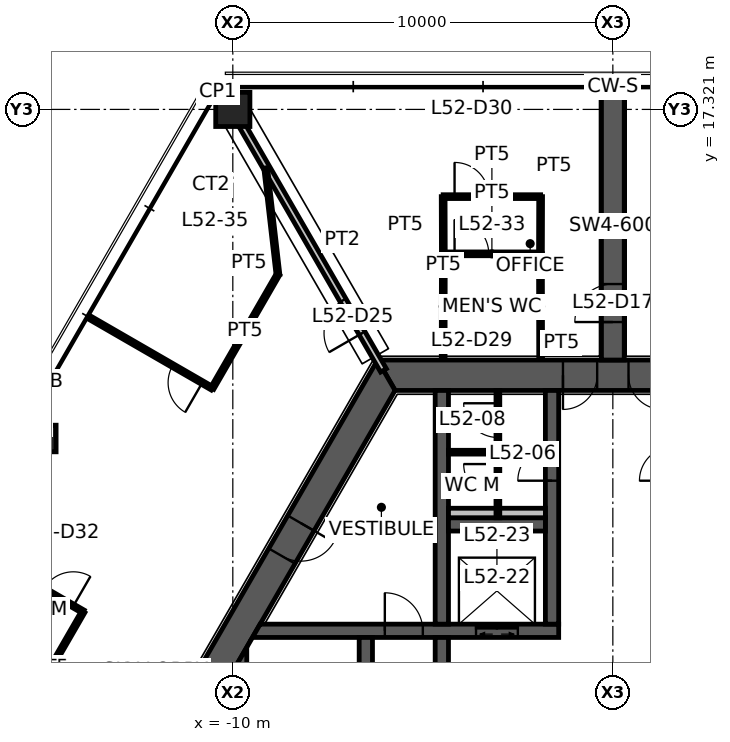
"""IFC4 building model, lengths in metres.
Left out: names, types, materials, properties, quantities, classifications, styles, units other than length and angle.
Written with IfcOpenShell. Run it as: python <this file> out.ifc"""

import sys

from ifc_helpers import new_model, si_unit, direction, frame, frame_2d, origin, origin_2d, place, context, subcontext, project, spatial, polyline, rectangle, hollow_rectangle, outline, extrude, element, fill, save


model = new_model("IFC4")
c1 = context("Model", 3, precision=1e-05, world=origin(), true_north=direction((0.0, 1.0)))
c2 = subcontext(c1, "Body", "Model", "MODEL_VIEW")
j1 = project(units=[si_unit("LENGTHUNIT", "METRE"), si_unit("PLANEANGLEUNIT", "RADIAN")], contexts=[c1])
p1 = place(None, origin())
s1 = spatial("IfcSite", under=j1, at=p1, CompositionType="ELEMENT")
p2 = place(p1, origin())
s2 = spatial("IfcBuilding", under=s1, at=p2, CompositionType="ELEMENT")
p3 = place(p2, frame((0.0, 0.0, 208.3)))
s3 = spatial("IfcBuildingStorey", under=s2, at=p3, CompositionType="ELEMENT", Elevation=208.3)
p4 = place(p3, frame((-10.0, 17.321, 0.0), z_axis=(0.0, 0.0, 1.0), x_axis=(1.0, 0.0, 0.0)))
e1 = element("IfcColumn", 1, at=p4, inside=s3, PredefinedType="COLUMN", context=c2, shape_type="SweptSolid", body=[
    extrude(hollow_rectangle(XDim=0.9, YDim=0.9, WallThickness=0.09, at=origin_2d()), origin(), (0.0, 0.0, 1.0), 4.5),
])
p5 = place(p3, frame((-15.0, 8.66, 0.0), z_axis=(0.0, 0.0, 1.0), x_axis=(1.0, 0.0, 0.0)))
e2 = element("IfcColumn", 2, at=p5, inside=s3, PredefinedType="COLUMN", context=c2, shape_type="SweptSolid", body=[
    extrude(hollow_rectangle(XDim=0.7, YDim=0.7, WallThickness=0.036, at=origin_2d()), origin(), (0.0, 0.0, 1.0), 4.5),
])
p6 = place(p3, frame((5.961, 10.325, 0.0), z_axis=(0.0, 0.0, 1.0), x_axis=(-1.0, 0.0, 0.0)))
e3 = element("IfcWall", 3, at=p6, inside=s3, PredefinedType="SHEAR", context=c2, shape_type="SweptSolid", body=[
    extrude(outline(polyline([(-0.231, -0.4), (4.649, -0.4), (5.549, -0.4), (6.374, -0.4), (7.273, -0.4), (12.153, -0.4), (11.691, 0.4), (7.273, 0.4), (6.374, 0.4), (5.549, 0.4), (4.649, 0.4), (0.231, 0.4), (-0.231, -0.4)])), origin(), (0.0, 0.0, 1.0), 4.5),
])
p7 = place(p6, frame((6.374, 0.0, 0.0)))
e4 = element("IfcOpeningElement", 4, at=p7, cuts=e3, PredefinedType="OPENING", context=c2, shape_type="SweptSolid", body=[
    extrude(rectangle(XDim=0.9, YDim=2.1, at=frame_2d((0.45, 1.05))), frame((0.0, 0.41, 0.0), z_axis=(0.0, -1.0, 0.0), x_axis=(1.0, 0.0, 0.0)), (0.0, 0.0, 1.0), 0.82),
])
p8 = place(p6, frame((4.649, 0.0, 0.0)))
e5 = element("IfcOpeningElement", 5, at=p8, cuts=e3, PredefinedType="OPENING", context=c2, shape_type="SweptSolid", body=[
    extrude(rectangle(XDim=0.9, YDim=2.1, at=frame_2d((0.45, 1.05))), frame((0.0, 0.41, 0.0), z_axis=(0.0, -1.0, 0.0), x_axis=(1.0, 0.0, 0.0)), (0.0, 0.0, 1.0), 0.82),
])
p9 = place(p3, frame((-5.961, 10.325, 0.0), z_axis=(0.0, 0.0, 1.0), x_axis=(-0.500004296715, -0.866022923061, 0.0)))
e6 = element("IfcWall", 6, at=p9, inside=s3, PredefinedType="SHEAR", context=c2, shape_type="SweptSolid", body=[
    extrude(outline(polyline([(-0.231, -0.4), (4.494, -0.4), (5.494, -0.4), (12.153, -0.4), (11.691, 0.4), (5.494, 0.4), (4.494, 0.4), (0.231, 0.4), (-0.231, -0.4)])), origin(), (0.0, 0.0, 1.0), 4.5),
])
p10 = place(p9, frame((4.494, 0.0, 0.0)))
e7 = element("IfcOpeningElement", 7, at=p10, cuts=e6, PredefinedType="OPENING", context=c2, shape_type="SweptSolid", body=[
    extrude(rectangle(XDim=1.0, YDim=2.1, at=frame_2d((0.5, 1.05))), frame((0.0, 0.41, 0.0), z_axis=(0.0, -1.0, 0.0), x_axis=(1.0, 0.0, 0.0)), (0.0, 0.0, 1.0), 0.82),
])
p11 = place(p3, frame((0.0, 10.725, 0.0), z_axis=(0.0, 0.0, 1.0), x_axis=(0.0, 1.0, 0.0)))
e8 = element("IfcWall", 8, at=p11, inside=s3, PredefinedType="SHEAR", context=c2, shape_type="SweptSolid", body=[
    extrude(rectangle(XDim=7.045, YDim=0.6, at=frame_2d((3.523, 0.0))), origin(), (0.0, 0.0, 1.0), 4.5),
])
p12 = place(p11, frame((1.0, 0.0, 0.0)))
e9 = element("IfcOpeningElement", 9, at=p12, cuts=e8, PredefinedType="OPENING", context=c2, shape_type="SweptSolid", body=[
    extrude(rectangle(XDim=1.0, YDim=2.1, at=frame_2d((0.5, 1.05))), frame((0.0, 0.31, 0.0), z_axis=(0.0, -1.0, 0.0), x_axis=(1.0, 0.0, 0.0)), (0.0, 0.0, 1.0), 0.62),
])
p13 = place(p3, frame((-9.382, 3.6, 0.0), z_axis=(0.0, 0.0, 1.0), x_axis=(1.0, 0.0, 0.0)))
e10 = element("IfcWall", 10, at=p13, inside=s3, PredefinedType="SHEAR", context=c2, shape_type="SweptSolid", body=[
    extrude(outline(polyline([(-0.101, -0.175), (3.382, -0.175), (4.382, -0.175), (5.782, -0.175), (6.882, -0.175), (7.957, -0.175), (7.957, 0.175), (6.882, 0.175), (5.782, 0.175), (4.382, 0.175), (3.382, 0.175), (0.101, 0.175), (-0.101, -0.175)])), origin(), (0.0, 0.0, 1.0), 4.5),
])
p14 = place(p13, frame((3.382, 0.0, 0.0)))
e11 = element("IfcOpeningElement", 11, at=p14, cuts=e10, PredefinedType="OPENING", context=c2, shape_type="SweptSolid", body=[
    extrude(rectangle(XDim=1.0, YDim=2.1, at=frame_2d((0.5, 1.05))), frame((0.0, 0.185, 0.0), z_axis=(0.0, -1.0, 0.0), x_axis=(1.0, 0.0, 0.0)), (0.0, 0.0, 1.0), 0.37),
])
p15 = place(p13, frame((5.782, 0.0, 0.0)))
e12 = element("IfcOpeningElement", 12, at=p15, cuts=e10, PredefinedType="OPENING", context=c2, shape_type="SweptSolid", body=[
    extrude(rectangle(XDim=1.1, YDim=2.1, at=frame_2d((0.55, 1.05))), frame((0.0, 0.185, 0.0), z_axis=(0.0, -1.0, 0.0), x_axis=(1.0, 0.0, 0.0)), (0.0, 0.0, 1.0), 0.37),
])
p16 = place(p3, frame((-1.6, 3.775, 0.0), z_axis=(0.0, 0.0, 1.0), x_axis=(0.0, 1.0, 0.0)))
e13 = element("IfcWall", 13, at=p16, inside=s3, PredefinedType="SHEAR", context=c2, shape_type="SweptSolid", body=[
    extrude(rectangle(XDim=6.15, YDim=0.35, at=frame_2d((3.075, 0.0))), origin(), (0.0, 0.0, 1.0), 4.5),
])
p17 = place(p16, frame((3.775, 0.0, 0.0)))
e14 = element("IfcOpeningElement", 14, at=p17, cuts=e13, PredefinedType="OPENING", context=c2, shape_type="SweptSolid", body=[
    extrude(rectangle(XDim=0.9, YDim=2.1, at=frame_2d((0.45, 1.05))), frame((0.0, 0.185, 0.0), z_axis=(0.0, -1.0, 0.0), x_axis=(1.0, 0.0, 0.0)), (0.0, 0.0, 1.0), 0.37),
])
p18 = place(p3, frame((-4.5, -3.425, 0.0), z_axis=(0.0, 0.0, 1.0), x_axis=(0.0, 1.0, 0.0)))
e15 = element("IfcWall", 15, at=p18, inside=s3, PredefinedType="SHEAR", context=c2, shape_type="SweptSolid", body=[
    extrude(rectangle(XDim=6.85, YDim=0.35, at=frame_2d((3.425, 0.0))), origin(), (0.0, 0.0, 1.0), 4.5),
])
p19 = place(p18, frame((2.925, 0.0, 0.0)))
e16 = element("IfcOpeningElement", 16, at=p19, cuts=e15, PredefinedType="OPENING", context=c2, shape_type="SweptSolid", body=[
    extrude(rectangle(XDim=1.0, YDim=2.1, at=frame_2d((0.5, 1.05))), frame((0.0, 0.185, 0.0), z_axis=(0.0, -1.0, 0.0), x_axis=(1.0, 0.0, 0.0)), (0.0, 0.0, 1.0), 0.37),
])
p20 = place(p3, frame((-6.5, -3.425, 0.0), z_axis=(0.0, 0.0, 1.0), x_axis=(0.0, 1.0, 0.0)))
e17 = element("IfcWall", 17, at=p20, inside=s3, PredefinedType="SHEAR", context=c2, shape_type="SweptSolid", body=[
    extrude(rectangle(XDim=6.85, YDim=0.35, at=frame_2d((3.425, 0.0))), origin(), (0.0, 0.0, 1.0), 4.5),
])
p21 = place(p20, frame((0.1, 0.0, 0.0)))
e18 = element("IfcOpeningElement", 18, at=p21, cuts=e17, PredefinedType="OPENING", context=c2, shape_type="SweptSolid", body=[
    extrude(rectangle(XDim=1.0, YDim=2.1, at=frame_2d((0.5, 1.05))), frame((0.0, 0.185, 0.0), z_axis=(0.0, -1.0, 0.0), x_axis=(1.0, 0.0, 0.0)), (0.0, 0.0, 1.0), 0.37),
])
p22 = place(p3, frame((-4.5, 3.775, 0.0), z_axis=(0.0, 0.0, 1.0), x_axis=(0.0, 1.0, 0.0)))
e19 = element("IfcWall", 19, at=p22, inside=s3, PredefinedType="SHEAR", context=c2, shape_type="SweptSolid", body=[
    extrude(rectangle(XDim=6.15, YDim=0.35, at=frame_2d((3.075, 0.0))), origin(), (0.0, 0.0, 1.0), 4.5),
])
p23 = place(p3, frame((-4.325, 6.4, 0.0), z_axis=(0.0, 0.0, 1.0), x_axis=(1.0, 0.0, 0.0)))
e20 = element("IfcWall", 20, at=p23, inside=s3, PredefinedType="SHEAR", context=c2, shape_type="SweptSolid", body=[
    extrude(rectangle(XDim=2.55, YDim=0.35, at=frame_2d((1.275, 0.0))), origin(), (0.0, 0.0, 1.0), 4.5),
])
p24 = place(p3, frame((-9.808, -2.862, 0.0), z_axis=(0.0, 0.0, 1.0), x_axis=(0.0, 1.0, 0.0)))
e21 = element("IfcWall", 21, at=p24, inside=s3, PredefinedType="SHEAR", context=c2, shape_type="SweptSolid", body=[
    extrude(outline(polyline([(-0.303, -0.175), (6.028, -0.175), (5.421, 0.175), (0.303, 0.175), (-0.303, -0.175)])), origin(), (0.0, 0.0, 1.0), 4.5),
])
p25 = place(p3, frame((-4.325, 6.7, 0.0), z_axis=(0.0, 0.0, 1.0), x_axis=(1.0, 0.0, 0.0)))
e22 = element("IfcWall", 22, at=p25, inside=s3, PredefinedType="PLUMBINGWALL", context=c2, shape_type="SweptSolid", body=[
    extrude(rectangle(XDim=2.55, YDim=0.25, at=frame_2d((1.275, 0.0))), origin(), (0.0, 0.0, 1.0), 4.5),
])
p26 = place(p3, frame((-3.025, 6.575, 0.0), z_axis=(0.0, 0.0, 1.0), x_axis=(0.0, 1.0, 0.0)))
e23 = element("IfcWall", 23, at=p26, inside=s3, PredefinedType="PARTITIONING", context=c2, shape_type="SweptSolid", body=[
    extrude(rectangle(XDim=3.35, YDim=0.1, at=frame_2d((1.675, 0.0))), origin(), (0.0, 0.0, 1.0), 3.55),
])
p27 = place(p26, frame((0.512, 0.0, 0.0)))
e24 = element("IfcOpeningElement", 24, at=p27, cuts=e23, PredefinedType="OPENING", context=c2, shape_type="SweptSolid", body=[
    extrude(rectangle(XDim=0.9, YDim=2.1, at=frame_2d((0.45, 1.05))), frame((0.0, 0.06, 0.0), z_axis=(0.0, -1.0, 0.0), x_axis=(1.0, 0.0, 0.0)), (0.0, 0.0, 1.0), 0.12),
])
p28 = place(p26, frame((2.113, 0.0, 0.0)))
e25 = element("IfcOpeningElement", 25, at=p28, cuts=e23, PredefinedType="OPENING", context=c2, shape_type="SweptSolid", body=[
    extrude(rectangle(XDim=0.9, YDim=2.1, at=frame_2d((0.45, 1.05))), frame((0.0, 0.06, 0.0), z_axis=(0.0, -1.0, 0.0), x_axis=(1.0, 0.0, 0.0)), (0.0, 0.0, 1.0), 0.12),
])
p29 = place(p3, frame((-3.075, 8.3, 0.0), z_axis=(0.0, 0.0, 1.0), x_axis=(-1.0, 0.0, 0.0)))
e26 = element("IfcWall", 26, at=p29, inside=s3, PredefinedType="PARTITIONING", context=c2, shape_type="SweptSolid", body=[
    extrude(rectangle(XDim=1.25, YDim=0.1, at=frame_2d((0.625, 0.0))), origin(), (0.0, 0.0, 1.0), 3.55),
])
p30 = place(p3, frame((-6.035, 10.453, 0.0), z_axis=(0.0, 0.0, 1.0), x_axis=(-0.499989830942, 0.866031274813, 0.0)))
e27 = element("IfcWall", 27, at=p30, inside=s3, PredefinedType="PARTITIONING", context=c2, shape_type="SweptSolid", body=[
    extrude(rectangle(XDim=7.93, YDim=0.175, at=frame_2d((3.965, 0.0))), origin(), (0.0, 0.0, 1.0), 3.65),
])
p31 = place(p30, frame((1.13, 0.0, 0.0)))
e28 = element("IfcOpeningElement", 28, at=p31, cuts=e27, PredefinedType="OPENING", context=c2, shape_type="SweptSolid", body=[
    extrude(rectangle(XDim=1.0, YDim=2.1, at=frame_2d((0.5, 1.05))), frame((0.0, 0.098, 0.0), z_axis=(0.0, -1.0, 0.0), x_axis=(1.0, 0.0, 0.0)), (0.0, 0.0, 1.0), 0.195),
])
p32 = place(p3, frame((-4.465, 13.52, 0.0), z_axis=(0.0, 0.0, 1.0), x_axis=(1.0, 0.0, 0.0)))
e29 = element("IfcWall", 29, at=p32, inside=s3, PredefinedType="PARTITIONING", context=c2, shape_type="SweptSolid", body=[
    extrude(rectangle(XDim=2.565, YDim=0.1, at=frame_2d((1.283, 0.0))), origin(), (0.0, 0.0, 1.0), 3.55),
])
p33 = place(p32, frame((0.3, 0.0, 0.0)))
e30 = element("IfcOpeningElement", 30, at=p33, cuts=e29, PredefinedType="OPENING", context=c2, shape_type="SweptSolid", body=[
    extrude(rectangle(XDim=0.9, YDim=2.1, at=frame_2d((0.45, 1.05))), frame((0.0, 0.06, 0.0), z_axis=(0.0, -1.0, 0.0), x_axis=(1.0, 0.0, 0.0)), (0.0, 0.0, 1.0), 0.12),
])
for number, where, z_axis, x_axis in (
    (31, (-4.465, 10.745, 0.0), (0.0, 0.0, 1.0), (0.002, 1.0, 0.0)),
    (32, (-1.905, 13.525, 0.0), (0.0, 0.0, 1.0), (0.002, -1.0, 0.0)),
):
    element("IfcWall", number, at=place(p3, frame(where, z_axis=z_axis, x_axis=x_axis)), inside=s3, PredefinedType="PARTITIONING", context=c2, shape_type="SweptSolid", body=[
        extrude(rectangle(XDim=2.78, YDim=0.1, at=frame_2d((1.39, 0.0))), origin(), (0.0, 0.0, 1.0), 3.55),
    ])
p34 = place(p3, frame((-4.465, 15.025, 0.0), z_axis=(0.0, 0.0, 1.0), x_axis=(1.0, 0.0, 0.0)))
e33 = element("IfcWall", 33, at=p34, inside=s3, PredefinedType="PARTITIONING", context=c2, shape_type="SweptSolid", body=[
    extrude(rectangle(XDim=2.565, YDim=0.1, at=frame_2d((1.283, 0.0))), origin(), (0.0, 0.0, 1.0), 3.55),
])
p35 = place(p34, frame((0.3, 0.0, 0.0)))
e34 = element("IfcOpeningElement", 34, at=p35, cuts=e33, PredefinedType="OPENING", context=c2, shape_type="SweptSolid", body=[
    extrude(rectangle(XDim=0.9, YDim=2.1, at=frame_2d((0.45, 1.05))), frame((0.0, 0.06, 0.0), z_axis=(0.0, -1.0, 0.0), x_axis=(1.0, 0.0, 0.0)), (0.0, 0.0, 1.0), 0.12),
])
for number, where, z_axis, x_axis in (
    (35, (-4.46, 13.525, 0.0), (0.0, 0.0, 1.0), (-0.003, 1.0, 0.0)),
    (36, (-1.9, 15.025, 0.0), (0.0, 0.0, 1.0), (-0.003, -1.0, 0.0)),
):
    element("IfcWall", number, at=place(p3, frame(where, z_axis=z_axis, x_axis=x_axis)), inside=s3, PredefinedType="PARTITIONING", context=c2, shape_type="SweptSolid", body=[
        extrude(rectangle(XDim=1.5, YDim=0.1, at=frame_2d((0.75, 0.0))), origin(), (0.0, 0.0, 1.0), 3.55),
    ])
p36 = place(p3, frame((-10.543, 9.98, 0.0), z_axis=(0.0, 0.0, 1.0), x_axis=(-0.866031296205, 0.499989793889, 0.0)))
e37 = element("IfcWall", 37, at=p36, inside=s3, PredefinedType="PARTITIONING", context=c2, shape_type="SweptSolid", body=[
    extrude(rectangle(XDim=3.689, YDim=0.1, at=frame_2d((1.844, 0.0))), origin(), (0.0, 0.0, 1.0), 3.55),
])
p37 = place(p36, frame((0.3, 0.0, 0.0)))
e38 = element("IfcOpeningElement", 38, at=p37, cuts=e37, PredefinedType="OPENING", context=c2, shape_type="SweptSolid", body=[
    extrude(rectangle(XDim=0.9, YDim=2.1, at=frame_2d((0.45, 1.05))), frame((0.0, 0.06, 0.0), z_axis=(0.0, -1.0, 0.0), x_axis=(1.0, 0.0, 0.0)), (0.0, 0.0, 1.0), 0.12),
])
p38 = place(p3, frame((-9.135, 15.782, 0.0), z_axis=(0.0, 0.0, 1.0), x_axis=(0.114243611342, -0.993452765494, 0.0)))
e39 = element("IfcWall", 39, at=p38, inside=s3, PredefinedType="PARTITIONING", context=c2, shape_type="SweptSolid", body=[
    extrude(rectangle(XDim=2.825, YDim=0.1, at=frame_2d((1.413, 0.0))), origin(), (0.0, 0.0, 1.0), 3.55),
])
p39 = place(p3, frame((-8.812, 12.976, 0.0), z_axis=(0.0, 0.0, 1.0), x_axis=(-0.500229396103, -0.865892921368, 0.0)))
e40 = element("IfcWall", 40, at=p39, inside=s3, PredefinedType="PARTITIONING", context=c2, shape_type="SweptSolid", body=[
    extrude(rectangle(XDim=3.46, YDim=0.1, at=frame_2d((1.73, 0.0))), origin(), (0.0, 0.0, 1.0), 3.55),
])
p40 = place(p3, frame((-17.219, 5.997, 0.0), z_axis=(0.0, 0.0, 1.0), x_axis=(0.86602253128, -0.50000497529, 0.0)))
e41 = element("IfcWall", 41, at=p40, inside=s3, PredefinedType="PARTITIONING", context=c2, shape_type="SweptSolid", body=[
    extrude(rectangle(XDim=3.79, YDim=0.1, at=frame_2d((1.895, 0.0))), origin(), (0.0, 0.0, 1.0), 3.55),
])
p41 = place(p40, frame((2.59, 0.0, 0.0)))
e42 = element("IfcOpeningElement", 42, at=p41, cuts=e41, PredefinedType="OPENING", context=c2, shape_type="SweptSolid", body=[
    extrude(rectangle(XDim=0.9, YDim=2.1, at=frame_2d((0.45, 1.05))), frame((0.0, 0.06, 0.0), z_axis=(0.0, -1.0, 0.0), x_axis=(1.0, 0.0, 0.0)), (0.0, 0.0, 1.0), 0.12),
])
p42 = place(p3, frame((-13.937, 4.102, 0.0), z_axis=(0.0, 0.0, 1.0), x_axis=(-0.500021524473, -0.866012976267, 0.0)))
e43 = element("IfcWall", 43, at=p42, inside=s3, PredefinedType="PARTITIONING", context=c2, shape_type="SweptSolid", body=[
    extrude(rectangle(XDim=3.415, YDim=0.1, at=frame_2d((1.708, 0.0))), origin(), (0.0, 0.0, 1.0), 3.55),
])
p43 = place(p3, frame((0.0, 17.771, 0.0), z_axis=(0.0, 0.0, 1.0), x_axis=(0.0, 1.0, 0.0)))
e44 = element("IfcWall", 44, at=p43, inside=s3, PredefinedType="PARTITIONING", context=c2, shape_type="SweptSolid", body=[
    extrude(rectangle(XDim=0.045, YDim=0.175, at=frame_2d((0.022, 0.0))), origin(), (0.0, 0.0, 1.0), 4.5),
])
p44 = place(p7, origin())
e45 = element("IfcDoor", 45, at=p44, inside=s3, OperationType="SINGLE_SWING_RIGHT", PredefinedType="DOOR", context=c2, shape_type="SweptSolid", body=[
    extrude(rectangle(XDim=0.9, YDim=2.1, at=frame_2d((0.45, 1.05))), frame((0.0, 0.025, 0.0), z_axis=(0.0, -1.0, 0.0), x_axis=(1.0, 0.0, 0.0)), (0.0, 0.0, 1.0), 0.05),
])
fill(e4, e45)
p45 = place(p8, origin())
e46 = element("IfcDoor", 46, at=p45, inside=s3, OperationType="SINGLE_SWING_LEFT", PredefinedType="DOOR", context=c2, shape_type="SweptSolid", body=[
    extrude(rectangle(XDim=0.9, YDim=2.1, at=frame_2d((0.45, 1.05))), frame((0.0, 0.025, 0.0), z_axis=(0.0, -1.0, 0.0), x_axis=(1.0, 0.0, 0.0)), (0.0, 0.0, 1.0), 0.05),
])
fill(e5, e46)
p46 = place(p10, origin())
e47 = element("IfcDoor", 47, at=p46, inside=s3, OperationType="SINGLE_SWING_LEFT", PredefinedType="DOOR", context=c2, shape_type="SweptSolid", body=[
    extrude(rectangle(XDim=1.0, YDim=2.1, at=frame_2d((0.5, 1.05))), frame((0.0, 0.025, 0.0), z_axis=(0.0, -1.0, 0.0), x_axis=(1.0, 0.0, 0.0)), (0.0, 0.0, 1.0), 0.05),
])
fill(e7, e47)
p47 = place(p14, origin())
e48 = element("IfcDoor", 48, at=p47, inside=s3, OperationType="SINGLE_SWING_LEFT", PredefinedType="DOOR", context=c2, shape_type="SweptSolid", body=[
    extrude(rectangle(XDim=1.0, YDim=2.1, at=frame_2d((0.5, 1.05))), frame((0.0, 0.025, 0.0), z_axis=(0.0, -1.0, 0.0), x_axis=(1.0, 0.0, 0.0)), (0.0, 0.0, 1.0), 0.05),
])
fill(e11, e48)
p48 = place(p17, origin())
e49 = element("IfcDoor", 49, at=p48, inside=s3, OperationType="SINGLE_SWING_LEFT", PredefinedType="DOOR", context=c2, shape_type="SweptSolid", body=[
    extrude(rectangle(XDim=0.9, YDim=2.1, at=frame_2d((0.45, 1.05))), frame((0.0, 0.025, 0.0), z_axis=(0.0, -1.0, 0.0), x_axis=(1.0, 0.0, 0.0)), (0.0, 0.0, 1.0), 0.05),
])
fill(e14, e49)
p49 = place(p12, origin())
e50 = element("IfcDoor", 50, at=p49, inside=s3, OperationType="SINGLE_SWING_LEFT", PredefinedType="DOOR", context=c2, shape_type="SweptSolid", body=[
    extrude(rectangle(XDim=1.0, YDim=2.1, at=frame_2d((0.5, 1.05))), frame((0.0, 0.025, 0.0), z_axis=(0.0, -1.0, 0.0), x_axis=(1.0, 0.0, 0.0)), (0.0, 0.0, 1.0), 0.05),
])
fill(e9, e50)
p50 = place(p27, origin())
e51 = element("IfcDoor", 51, at=p50, inside=s3, OperationType="SINGLE_SWING_RIGHT", PredefinedType="DOOR", context=c2, shape_type="SweptSolid", body=[
    extrude(rectangle(XDim=0.9, YDim=2.1, at=frame_2d((0.45, 1.05))), frame((0.0, 0.025, 0.0), z_axis=(0.0, -1.0, 0.0), x_axis=(1.0, 0.0, 0.0)), (0.0, 0.0, 1.0), 0.05),
])
fill(e24, e51)
p51 = place(p28, origin())
e52 = element("IfcDoor", 52, at=p51, inside=s3, OperationType="SINGLE_SWING_RIGHT", PredefinedType="DOOR", context=c2, shape_type="SweptSolid", body=[
    extrude(rectangle(XDim=0.9, YDim=2.1, at=frame_2d((0.45, 1.05))), frame((0.0, 0.025, 0.0), z_axis=(0.0, -1.0, 0.0), x_axis=(1.0, 0.0, 0.0)), (0.0, 0.0, 1.0), 0.05),
])
fill(e25, e52)
p52 = place(p31, origin())
e53 = element("IfcDoor", 53, at=p52, inside=s3, OperationType="SINGLE_SWING_LEFT", PredefinedType="DOOR", context=c2, shape_type="SweptSolid", body=[
    extrude(rectangle(XDim=1.0, YDim=2.1, at=frame_2d((0.5, 1.05))), frame((0.0, 0.025, 0.0), z_axis=(0.0, -1.0, 0.0), x_axis=(1.0, 0.0, 0.0)), (0.0, 0.0, 1.0), 0.05),
])
fill(e28, e53)
p53 = place(p33, origin())
e54 = element("IfcDoor", 54, at=p53, inside=s3, OperationType="SINGLE_SWING_LEFT", PredefinedType="DOOR", context=c2, shape_type="SweptSolid", body=[
    extrude(rectangle(XDim=0.9, YDim=2.1, at=frame_2d((0.45, 1.05))), frame((0.0, 0.025, 0.0), z_axis=(0.0, -1.0, 0.0), x_axis=(1.0, 0.0, 0.0)), (0.0, 0.0, 1.0), 0.05),
])
fill(e30, e54)
p54 = place(p35, origin())
e55 = element("IfcDoor", 55, at=p54, inside=s3, OperationType="SINGLE_SWING_LEFT", PredefinedType="DOOR", context=c2, shape_type="SweptSolid", body=[
    extrude(rectangle(XDim=0.9, YDim=2.1, at=frame_2d((0.45, 1.05))), frame((0.0, 0.025, 0.0), z_axis=(0.0, -1.0, 0.0), x_axis=(1.0, 0.0, 0.0)), (0.0, 0.0, 1.0), 0.05),
])
fill(e34, e55)
p55 = place(p37, origin())
e56 = element("IfcDoor", 56, at=p55, inside=s3, OperationType="SINGLE_SWING_LEFT", PredefinedType="DOOR", context=c2, shape_type="SweptSolid", body=[
    extrude(rectangle(XDim=0.9, YDim=2.1, at=frame_2d((0.45, 1.05))), frame((0.0, 0.025, 0.0), z_axis=(0.0, -1.0, 0.0), x_axis=(1.0, 0.0, 0.0)), (0.0, 0.0, 1.0), 0.05),
])
fill(e38, e56)
p56 = place(p41, origin())
e57 = element("IfcDoor", 57, at=p56, inside=s3, OperationType="SINGLE_SWING_RIGHT", PredefinedType="DOOR", context=c2, shape_type="SweptSolid", body=[
    extrude(rectangle(XDim=0.9, YDim=2.1, at=frame_2d((0.45, 1.05))), frame((0.0, 0.025, 0.0), z_axis=(0.0, -1.0, 0.0), x_axis=(1.0, 0.0, 0.0)), (0.0, 0.0, 1.0), 0.05),
])
fill(e42, e57)
p57 = place(p15, origin())
e58 = element("IfcDoor", 58, at=p57, inside=s3, OperationType="DOUBLE_DOOR_SLIDING", PredefinedType="DOOR", context=c2, shape_type="SweptSolid", body=[
    extrude(rectangle(XDim=1.1, YDim=2.1, at=frame_2d((0.55, 1.05))), frame((0.0, 0.025, 0.0), z_axis=(0.0, -1.0, 0.0), x_axis=(1.0, 0.0, 0.0)), (0.0, 0.0, 1.0), 0.05),
])
fill(e12, e58)
save(model, sys.argv[1])
